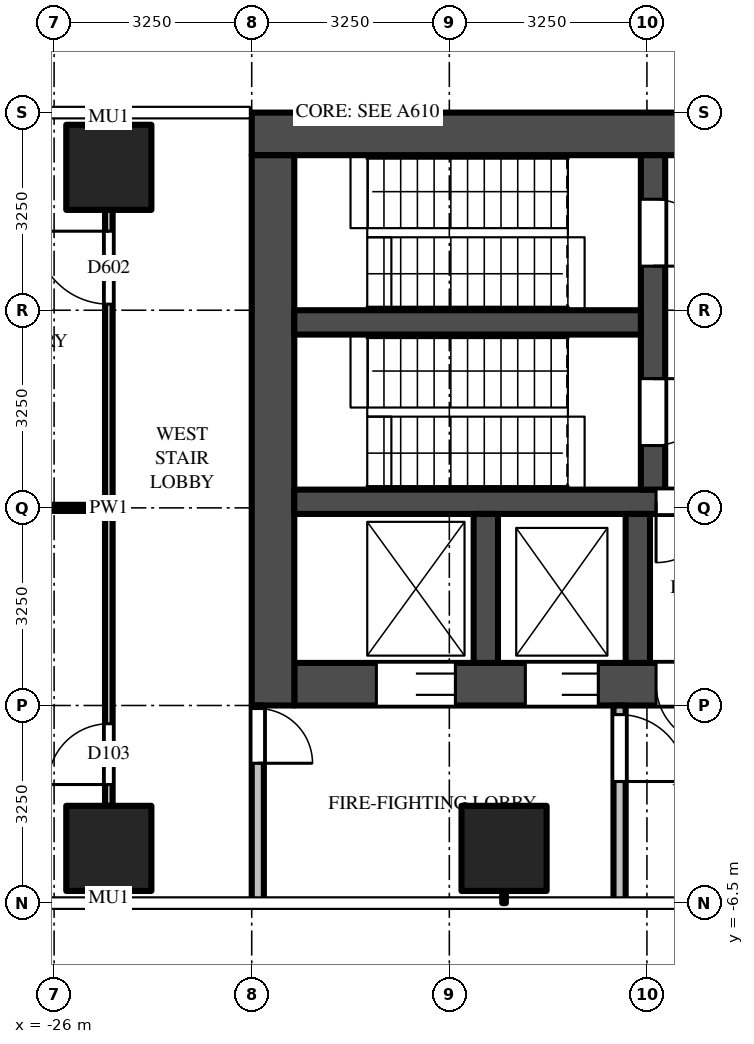
"""IFC4 building model, lengths in metres.
Left out: names, types, materials, properties, quantities, classifications, styles, units other than length and angle.
Written with IfcOpenShell. Run it as: python <this file> out.ifc"""

import sys

from ifc_helpers import new_model, si_unit, direction, frame, frame_2d, origin, origin_2d, place, context, subcontext, project, spatial, rectangle, extrude, source, transform, mapped, element, fill, save


model = new_model("IFC4")
c1 = context("Model", 3, precision=1e-05, world=origin(), true_north=direction((0.0, 1.0)))
c2 = subcontext(c1, "Body", "Model", "MODEL_VIEW")
j1 = project(units=[si_unit("LENGTHUNIT", "METRE"), si_unit("PLANEANGLEUNIT", "RADIAN")], contexts=[c1])
p1 = place(None, origin())
s1 = spatial("IfcSite", under=j1, at=p1, CompositionType="ELEMENT")
p2 = place(p1, origin())
s2 = spatial("IfcBuilding", under=s1, at=p2, CompositionType="ELEMENT")
p3 = place(p2, frame((0.0, 0.0, 74.5)))
s3 = spatial("IfcBuildingStorey", under=s2, at=p3, CompositionType="ELEMENT", Elevation=74.5)
m1 = source(origin(), c2, "Body", "SweptSolid", [
    extrude(rectangle(XDim=1.4, YDim=1.4, at=origin_2d()), origin(), (0.0, 0.0, 1.0), 4.5),
])
for number, where, z_axis, x_axis in (
    (1, (-18.6, -5.6, 0.0), (0.0, 0.0, 1.0), (1.0, 0.0, 0.0)),
    (2, (-25.1, -5.6, 0.0), (0.0, 0.0, 1.0), (1.0, 0.0, 0.0)),
    (3, (-25.1, 5.6, 0.0), (0.0, 0.0, 1.0), (1.0, 0.0, 0.0)),
):
    element("IfcColumn", number, at=place(p3, frame(where, z_axis=z_axis, x_axis=x_axis)), inside=s3, PredefinedType="COLUMN", context=c2, shape_type="MappedRepresentation", body=[
        mapped(m1, transform((0.0, 0.0, 0.0))),
    ])
m2 = source(origin(), c2, "Body", "SweptSolid", [
    extrude(rectangle(XDim=16.45, YDim=0.7, at=frame_2d((8.225, 0.0))), origin(), (0.0, 0.0, 1.0), 4.25),
])
p4 = place(p3, frame((-6.3, 6.15, 0.0), z_axis=(0.0, 0.0, 1.0), x_axis=(-1.0, 0.0, 0.0)))
e4 = element("IfcWall", 4, at=p4, inside=s3, PredefinedType="SHEAR", context=c2, shape_type="MappedRepresentation", body=[
    mapped(m2, transform((0.0, 0.0, 0.0))),
])
m3 = source(origin(), c2, "Body", "SweptSolid", [
    extrude(rectangle(XDim=14.85, YDim=0.7, at=frame_2d((7.425, 0.0))), origin(), (0.0, 0.0, 1.0), 4.25),
])
p5 = place(p3, frame((-7.2, -2.9, 0.0), z_axis=(0.0, 0.0, 1.0), x_axis=(-1.0, 0.0, 0.0)))
e5 = element("IfcWall", 5, at=p5, inside=s3, PredefinedType="SHEAR", context=c2, shape_type="MappedRepresentation", body=[
    mapped(m3, transform((0.0, 0.0, 0.0))),
])
m4 = source(origin(), c2, "Body", "SweptSolid", [
    extrude(rectangle(XDim=1.3, YDim=2.1, at=frame_2d((0.65, 1.05))), frame((0.0, 0.36, 0.0), z_axis=(0.0, -1.0, 0.0), x_axis=(1.0, 0.0, 0.0)), (0.0, 0.0, 1.0), 0.72),
])
p6 = place(p5, frame((12.2, 0.0, 0.0)))
e6 = element("IfcOpeningElement", 6, at=p6, cuts=e5, PredefinedType="OPENING", context=c2, shape_type="MappedRepresentation", body=[
    mapped(m4, transform((0.0, 0.0, 0.0))),
])
m5 = source(origin(), c2, "Body", "SweptSolid", [
    extrude(rectangle(XDim=1.2, YDim=2.1, at=frame_2d((0.6, 1.05))), frame((0.0, 0.36, 0.0), z_axis=(0.0, -1.0, 0.0), x_axis=(1.0, 0.0, 0.0)), (0.0, 0.0, 1.0), 0.72),
])
p7 = place(p5, frame((9.85, 0.0, 0.0)))
e7 = element("IfcOpeningElement", 7, at=p7, cuts=e5, PredefinedType="OPENING", context=c2, shape_type="MappedRepresentation", body=[
    mapped(m5, transform((0.0, 0.0, 0.0))),
])
m6 = source(origin(), c2, "Body", "SweptSolid", [
    extrude(rectangle(XDim=1.0, YDim=2.1, at=frame_2d((0.5, 1.05))), frame((0.0, 0.36, 0.0), z_axis=(0.0, -1.0, 0.0), x_axis=(1.0, 0.0, 0.0)), (0.0, 0.0, 1.0), 0.72),
])
p8 = place(p5, frame((7.9, 0.0, 0.0)))
e8 = element("IfcOpeningElement", 8, at=p8, cuts=e5, PredefinedType="OPENING", context=c2, shape_type="MappedRepresentation", body=[
    mapped(m6, transform((0.0, 0.0, 0.0))),
])
m7 = source(origin(), c2, "Body", "SweptSolid", [
    extrude(rectangle(XDim=0.8, YDim=2.1, at=frame_2d((0.4, 1.05))), frame((0.0, 0.36, 0.0), z_axis=(0.0, -1.0, 0.0), x_axis=(1.0, 0.0, 0.0)), (0.0, 0.0, 1.0), 0.72),
])
p9 = place(p5, frame((0.113, 0.0, 0.0)))
e9 = element("IfcOpeningElement", 9, at=p9, cuts=e5, PredefinedType="OPENING", context=c2, shape_type="MappedRepresentation", body=[
    mapped(m7, transform((0.0, 0.0, 0.0))),
])
p10 = place(p5, frame((1.288, 0.0, 0.0)))
e10 = element("IfcOpeningElement", 10, at=p10, cuts=e5, PredefinedType="OPENING", context=c2, shape_type="MappedRepresentation", body=[
    mapped(m7, transform((0.0, 0.0, 0.0))),
])
p11 = place(p5, frame((2.712, 0.0, 0.0)))
e11 = element("IfcOpeningElement", 11, at=p11, cuts=e5, PredefinedType="OPENING", context=c2, shape_type="MappedRepresentation", body=[
    mapped(m7, transform((0.0, 0.0, 0.0))),
])
p12 = place(p5, frame((3.887, 0.0, 0.0)))
e12 = element("IfcOpeningElement", 12, at=p12, cuts=e5, PredefinedType="OPENING", context=c2, shape_type="MappedRepresentation", body=[
    mapped(m7, transform((0.0, 0.0, 0.0))),
])
p13 = place(p5, frame((5.312, 0.0, 0.0)))
e13 = element("IfcOpeningElement", 13, at=p13, cuts=e5, PredefinedType="OPENING", context=c2, shape_type="MappedRepresentation", body=[
    mapped(m7, transform((0.0, 0.0, 0.0))),
])
p14 = place(p5, frame((6.488, 0.0, 0.0)))
e14 = element("IfcOpeningElement", 14, at=p14, cuts=e5, PredefinedType="OPENING", context=c2, shape_type="MappedRepresentation", body=[
    mapped(m7, transform((0.0, 0.0, 0.0))),
])
m8 = source(origin(), c2, "Body", "SweptSolid", [
    extrude(rectangle(XDim=9.05, YDim=0.7, at=frame_2d((4.525, 0.0))), origin(), (0.0, 0.0, 1.0), 4.25),
])
p15 = place(p3, frame((-22.4, 5.8, 0.0), z_axis=(0.0, 0.0, 1.0), x_axis=(0.0, -1.0, 0.0)))
e15 = element("IfcWall", 15, at=p15, inside=s3, PredefinedType="SHEAR", context=c2, shape_type="MappedRepresentation", body=[
    mapped(m8, transform((0.0, 0.0, 0.0))),
])
m9 = source(origin(), c2, "Body", "SweptSolid", [
    extrude(rectangle(XDim=14.85, YDim=0.4, at=frame_2d((7.425, 0.0))), origin(), (0.0, 0.0, 1.0), 4.25),
])
p16 = place(p3, frame((-7.2, 0.1, 0.0), z_axis=(0.0, 0.0, 1.0), x_axis=(-1.0, 0.0, 0.0)))
e16 = element("IfcWall", 16, at=p16, inside=s3, PredefinedType="SHEAR", context=c2, shape_type="MappedRepresentation", body=[
    mapped(m9, transform((0.0, 0.0, 0.0))),
])
m10 = source(origin(), c2, "Body", "SweptSolid", [
    extrude(rectangle(XDim=1.0, YDim=2.1, at=frame_2d((0.5, 1.05))), frame((0.0, 0.21, 0.0), z_axis=(0.0, -1.0, 0.0), x_axis=(1.0, 0.0, 0.0)), (0.0, 0.0, 1.0), 0.42),
])
p17 = place(p16, frame((7.9, 0.0, 0.0)))
e17 = element("IfcOpeningElement", 17, at=p17, cuts=e16, PredefinedType="OPENING", context=c2, shape_type="MappedRepresentation", body=[
    mapped(m10, transform((0.0, 0.0, 0.0))),
])
m11 = source(origin(), c2, "Body", "SweptSolid", [
    extrude(rectangle(XDim=5.5, YDim=0.4, at=frame_2d((2.75, 0.0))), origin(), (0.0, 0.0, 1.0), 4.25),
])
p18 = place(p3, frame((-16.15, 5.8, 0.0), z_axis=(0.0, 0.0, 1.0), x_axis=(0.0, -1.0, 0.0)))
e18 = element("IfcWall", 18, at=p18, inside=s3, PredefinedType="SHEAR", context=c2, shape_type="MappedRepresentation", body=[
    mapped(m11, transform((0.0, 0.0, 0.0))),
])
m12 = source(origin(), c2, "Body", "SweptSolid", [
    extrude(rectangle(XDim=1.1, YDim=2.1, at=frame_2d((0.55, 1.05))), frame((0.0, 0.21, 0.0), z_axis=(0.0, -1.0, 0.0), x_axis=(1.0, 0.0, 0.0)), (0.0, 0.0, 1.0), 0.42),
])
p19 = place(p18, frame((0.725, 0.0, 0.0)))
e19 = element("IfcOpeningElement", 19, at=p19, cuts=e18, PredefinedType="OPENING", context=c2, shape_type="MappedRepresentation", body=[
    mapped(m12, transform((0.0, 0.0, 0.0))),
])
p20 = place(p18, frame((3.675, 0.0, 0.0)))
e20 = element("IfcOpeningElement", 20, at=p20, cuts=e18, PredefinedType="OPENING", context=c2, shape_type="MappedRepresentation", body=[
    mapped(m12, transform((0.0, 0.0, 0.0))),
])
m13 = source(origin(), c2, "Body", "SweptSolid", [
    extrude(rectangle(XDim=5.7, YDim=0.4, at=frame_2d((2.85, 0.0))), origin(), (0.0, 0.0, 1.0), 4.25),
])
p21 = place(p3, frame((-16.35, 3.05, 0.0), z_axis=(0.0, 0.0, 1.0), x_axis=(-1.0, 0.0, 0.0)))
e21 = element("IfcWall", 21, at=p21, inside=s3, PredefinedType="SHEAR", context=c2, shape_type="MappedRepresentation", body=[
    mapped(m13, transform((0.0, 0.0, 0.0))),
])
m14 = source(origin(), c2, "Body", "SweptSolid", [
    extrude(rectangle(XDim=2.45, YDim=0.4, at=frame_2d((1.225, 0.0))), origin(), (0.0, 0.0, 1.0), 4.25),
])
for number, where, z_axis, x_axis in (
    (22, (-16.4, -0.1, 0.0), (0.0, 0.0, 1.0), (0.0, -1.0, 0.0)),
    (23, (-18.9, -0.1, 0.0), (0.0, 0.0, 1.0), (0.0, -1.0, 0.0)),
):
    element("IfcWall", number, at=place(p3, frame(where, z_axis=z_axis, x_axis=x_axis)), inside=s3, PredefinedType="SHEAR", context=c2, shape_type="MappedRepresentation", body=[
        mapped(m14, transform((0.0, 0.0, 0.0))),
    ])
m15 = source(origin(), c2, "Body", "SweptSolid", [
    extrude(rectangle(XDim=3.25, YDim=0.2, at=frame_2d((1.625, 0.0))), origin(), (0.0, 0.0, 1.0), 4.25),
])
p22 = place(p3, frame((-16.7, -3.25, 0.0), z_axis=(0.0, 0.0, 1.0), x_axis=(0.0, -1.0, 0.0)))
e24 = element("IfcWall", 24, at=p22, inside=s3, PredefinedType="PARTITIONING", context=c2, shape_type="MappedRepresentation", body=[
    mapped(m15, transform((0.0, 0.0, 0.0))),
])
m16 = source(origin(), c2, "Body", "SweptSolid", [
    extrude(rectangle(XDim=1.1, YDim=2.1, at=frame_2d((0.55, 1.05))), frame((0.0, 0.11, 0.0), z_axis=(0.0, -1.0, 0.0), x_axis=(1.0, 0.0, 0.0)), (0.0, 0.0, 1.0), 0.22),
])
p23 = place(p22, frame((0.15, 0.0, 0.0)))
e25 = element("IfcOpeningElement", 25, at=p23, cuts=e24, PredefinedType="OPENING", context=c2, shape_type="MappedRepresentation", body=[
    mapped(m16, transform((0.0, 0.0, 0.0))),
])
p24 = place(p3, frame((-22.65, -3.25, 0.0), z_axis=(0.0, 0.0, 1.0), x_axis=(0.0, -1.0, 0.0)))
e26 = element("IfcWall", 26, at=p24, inside=s3, PredefinedType="PARTITIONING", context=c2, shape_type="MappedRepresentation", body=[
    mapped(m15, transform((0.0, 0.0, 0.0))),
])
m17 = source(origin(), c2, "Body", "SweptSolid", [
    extrude(rectangle(XDim=0.9, YDim=2.1, at=frame_2d((0.45, 1.05))), frame((0.0, 0.11, 0.0), z_axis=(0.0, -1.0, 0.0), x_axis=(1.0, 0.0, 0.0)), (0.0, 0.0, 1.0), 0.22),
])
p25 = place(p24, frame((0.05, 0.0, 0.0)))
e27 = element("IfcOpeningElement", 27, at=p25, cuts=e26, PredefinedType="OPENING", context=c2, shape_type="MappedRepresentation", body=[
    mapped(m17, transform((0.0, 0.0, 0.0))),
])
m18 = source(origin(), c2, "Body", "SweptSolid", [
    extrude(rectangle(XDim=9.8, YDim=0.125, at=frame_2d((4.9, 0.0))), origin(), (0.0, 0.0, 1.0), 3.468),
])
p26 = place(p3, frame((-25.1, -4.9, 0.0), z_axis=(0.0, 0.0, 1.0), x_axis=(0.0, 1.0, 0.0)))
e28 = element("IfcWall", 28, at=p26, inside=s3, PredefinedType="PARTITIONING", context=c2, shape_type="MappedRepresentation", body=[
    mapped(m18, transform((0.0, 0.0, 0.0))),
])
m19 = source(origin(), c2, "Body", "SweptSolid", [
    extrude(rectangle(XDim=1.0, YDim=2.1, at=frame_2d((0.5, 1.05))), frame((0.0, 0.073, 0.0), z_axis=(0.0, -1.0, 0.0), x_axis=(1.0, 0.0, 0.0)), (0.0, 0.0, 1.0), 0.145),
])
p27 = place(p26, frame((0.35, 0.0, 0.0)))
e29 = element("IfcOpeningElement", 29, at=p27, cuts=e28, PredefinedType="OPENING", context=c2, shape_type="MappedRepresentation", body=[
    mapped(m19, transform((0.0, 0.0, 0.0))),
])
m20 = source(origin(), c2, "Body", "SweptSolid", [
    extrude(rectangle(XDim=1.2, YDim=2.1, at=frame_2d((0.6, 1.05))), frame((0.0, 0.073, 0.0), z_axis=(0.0, -1.0, 0.0), x_axis=(1.0, 0.0, 0.0)), (0.0, 0.0, 1.0), 0.145),
])
p28 = place(p26, frame((8.25, 0.0, 0.0)))
e30 = element("IfcOpeningElement", 30, at=p28, cuts=e28, PredefinedType="OPENING", context=c2, shape_type="MappedRepresentation", body=[
    mapped(m20, transform((0.0, 0.0, 0.0))),
])
m21 = source(origin(), c2, "Body", "SweptSolid", [
    extrude(rectangle(XDim=7.137, YDim=0.1, at=frame_2d((3.569, 0.0))), origin(), (0.0, 0.0, 1.0), 3.33),
])
p29 = place(p3, frame((-32.3, 0.0, 0.0), z_axis=(0.0, 0.0, 1.0), x_axis=(1.0, 0.0, 0.0)))
e31 = element("IfcWall", 31, at=p29, inside=s3, PredefinedType="PARTITIONING", context=c2, shape_type="MappedRepresentation", body=[
    mapped(m21, transform((0.0, 0.0, 0.0))),
])
m22 = source(origin(), c2, "Body", "SweptSolid", [
    extrude(rectangle(XDim=1.3, YDim=2.1, at=frame_2d((0.65, 1.05))), frame((0.0, -0.275, 0.0), z_axis=(0.0, -1.0, 0.0), x_axis=(1.0, 0.0, 0.0)), (0.0, 0.0, 1.0), 0.05),
])
p30 = place(p6, origin())
e32 = element("IfcDoor", 32, at=p30, inside=s3, OperationType="DOUBLE_DOOR_SLIDING", PredefinedType="DOOR", context=c2, shape_type="MappedRepresentation", body=[
    mapped(m22, transform((0.0, 0.0, 0.0))),
])
fill(e6, e32)
m23 = source(origin(), c2, "Body", "SweptSolid", [
    extrude(rectangle(XDim=1.2, YDim=2.1, at=frame_2d((0.6, 1.05))), frame((0.0, -0.275, 0.0), z_axis=(0.0, -1.0, 0.0), x_axis=(1.0, 0.0, 0.0)), (0.0, 0.0, 1.0), 0.05),
])
p31 = place(p7, origin())
e33 = element("IfcDoor", 33, at=p31, inside=s3, OperationType="DOUBLE_DOOR_SLIDING", PredefinedType="DOOR", context=c2, shape_type="MappedRepresentation", body=[
    mapped(m23, transform((0.0, 0.0, 0.0))),
])
fill(e7, e33)
m24 = source(origin(), c2, "Body", "SweptSolid", [
    extrude(rectangle(XDim=1.1, YDim=2.1, at=frame_2d((0.55, 1.05))), frame((0.0, 0.025, 0.0), z_axis=(0.0, -1.0, 0.0), x_axis=(1.0, 0.0, 0.0)), (0.0, 0.0, 1.0), 0.05),
])
p32 = place(p19, origin())
e34 = element("IfcDoor", 34, at=p32, inside=s3, OperationType="SINGLE_SWING_RIGHT", PredefinedType="DOOR", context=c2, shape_type="MappedRepresentation", body=[
    mapped(m24, transform((0.0, 0.0, 0.0))),
])
fill(e19, e34)
p33 = place(p20, origin())
e35 = element("IfcDoor", 35, at=p33, inside=s3, OperationType="SINGLE_SWING_LEFT", PredefinedType="DOOR", context=c2, shape_type="MappedRepresentation", body=[
    mapped(m24, transform((0.0, 0.0, 0.0))),
])
fill(e20, e35)
m25 = source(origin(), c2, "Body", "SweptSolid", [
    extrude(rectangle(XDim=1.0, YDim=2.1, at=frame_2d((0.5, 1.05))), frame((0.0, 0.025, 0.0), z_axis=(0.0, -1.0, 0.0), x_axis=(1.0, 0.0, 0.0)), (0.0, 0.0, 1.0), 0.05),
])
p34 = place(p17, origin())
e36 = element("IfcDoor", 36, at=p34, inside=s3, OperationType="SINGLE_SWING_RIGHT", PredefinedType="DOOR", context=c2, shape_type="MappedRepresentation", body=[
    mapped(m25, transform((0.0, 0.0, 0.0))),
])
fill(e17, e36)
m26 = source(origin(), c2, "Body", "SweptSolid", [
    extrude(rectangle(XDim=1.0, YDim=2.1, at=frame_2d((0.5, 1.05))), frame((0.0, -0.275, 0.0), z_axis=(0.0, -1.0, 0.0), x_axis=(1.0, 0.0, 0.0)), (0.0, 0.0, 1.0), 0.05),
])
p35 = place(p8, origin())
e37 = element("IfcDoor", 37, at=p35, inside=s3, OperationType="SINGLE_SWING_LEFT", PredefinedType="DOOR", context=c2, shape_type="MappedRepresentation", body=[
    mapped(m26, transform((0.0, 0.0, 0.0))),
])
fill(e8, e37)
p36 = place(p23, origin())
e38 = element("IfcDoor", 38, at=p36, inside=s3, OperationType="SINGLE_SWING_RIGHT", PredefinedType="DOOR", context=c2, shape_type="MappedRepresentation", body=[
    mapped(m24, transform((0.0, 0.0, 0.0))),
])
fill(e25, e38)
m27 = source(origin(), c2, "Body", "SweptSolid", [
    extrude(rectangle(XDim=0.9, YDim=2.1, at=frame_2d((0.45, 1.05))), frame((0.0, 0.025, 0.0), z_axis=(0.0, -1.0, 0.0), x_axis=(1.0, 0.0, 0.0)), (0.0, 0.0, 1.0), 0.05),
])
p37 = place(p25, origin())
e39 = element("IfcDoor", 39, at=p37, inside=s3, OperationType="SINGLE_SWING_RIGHT", PredefinedType="DOOR", context=c2, shape_type="MappedRepresentation", body=[
    mapped(m27, transform((0.0, 0.0, 0.0))),
])
fill(e27, e39)
p38 = place(p27, origin())
e40 = element("IfcDoor", 40, at=p38, inside=s3, OperationType="SINGLE_SWING_LEFT", PredefinedType="DOOR", context=c2, shape_type="MappedRepresentation", body=[
    mapped(m25, transform((0.0, 0.0, 0.0))),
])
fill(e29, e40)
m28 = source(origin(), c2, "Body", "SweptSolid", [
    extrude(rectangle(XDim=1.2, YDim=2.1, at=frame_2d((0.6, 1.05))), frame((0.0, 0.025, 0.0), z_axis=(0.0, -1.0, 0.0), x_axis=(1.0, 0.0, 0.0)), (0.0, 0.0, 1.0), 0.05),
])
p39 = place(p28, origin())
e41 = element("IfcDoor", 41, at=p39, inside=s3, OperationType="SINGLE_SWING_RIGHT", PredefinedType="DOOR", context=c2, shape_type="MappedRepresentation", body=[
    mapped(m28, transform((0.0, 0.0, 0.0))),
])
fill(e30, e41)
save(model, sys.argv[1])
